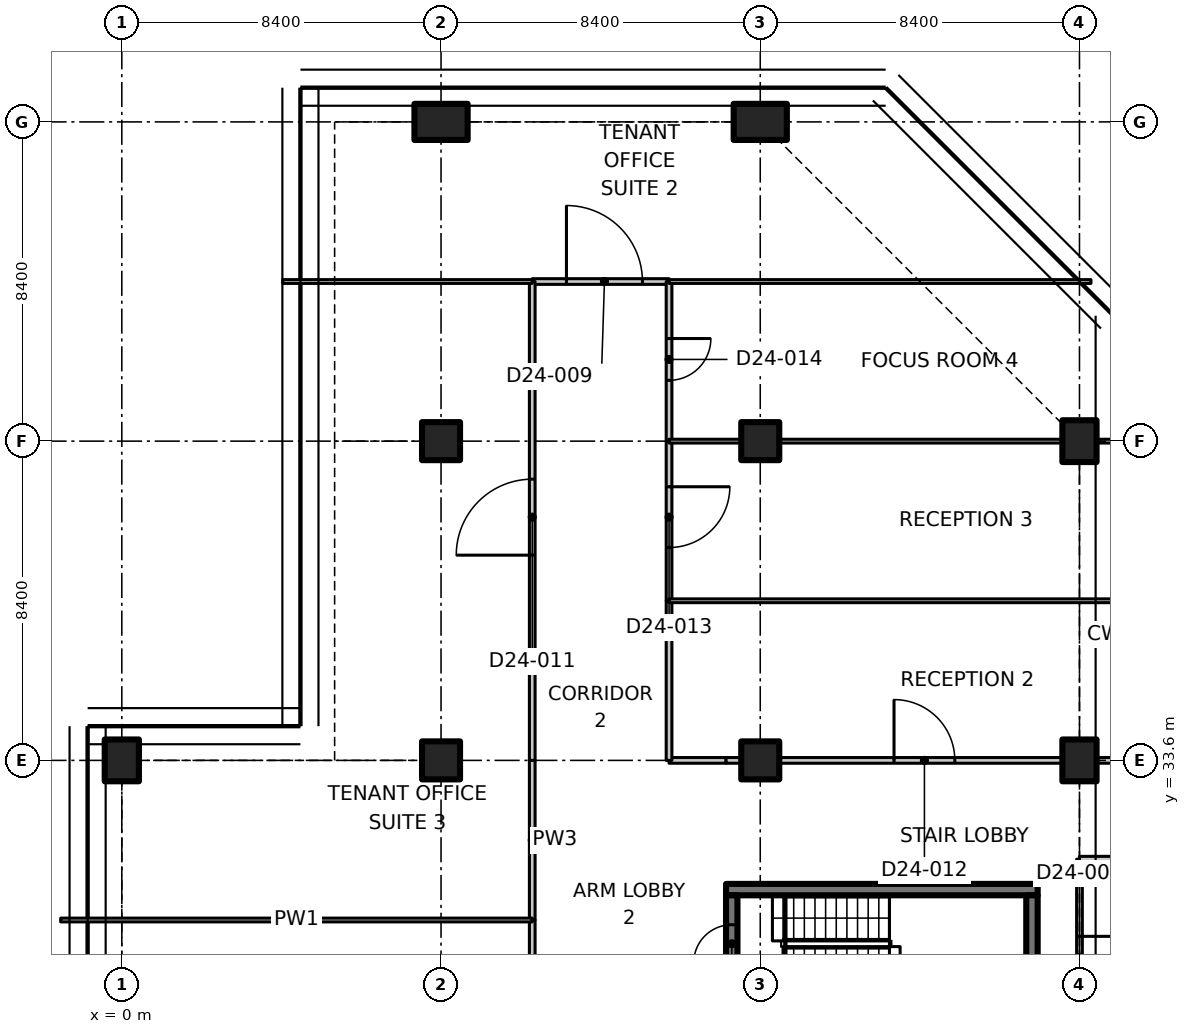
"""IFC4 building model, lengths in metres.
Left out: names, types, materials, properties, quantities, classifications, styles, units other than length and angle.
Written with IfcOpenShell. Run it as: python <this file> out.ifc"""

import sys

from ifc_helpers import new_model, si_unit, direction, frame, frame_2d, origin, origin_2d, place, context, subcontext, project, spatial, polyline, rectangle, outline, extrude, element, fill, save


model = new_model("IFC4")
c1 = context("Model", 3, precision=1e-05, world=origin(), true_north=direction((0.0, 1.0)))
c2 = subcontext(c1, "Body", "Model", "MODEL_VIEW")
j1 = project(units=[si_unit("LENGTHUNIT", "METRE"), si_unit("PLANEANGLEUNIT", "RADIAN")], contexts=[c1])
p1 = place(None, origin())
s1 = spatial("IfcSite", under=j1, at=p1, CompositionType="ELEMENT")
p2 = place(p1, origin())
s2 = spatial("IfcBuilding", under=s1, at=p2, CompositionType="ELEMENT")
p3 = place(p2, frame((0.0, 0.0, 199.2)))
s3 = spatial("IfcBuildingStorey", under=s2, at=p3, CompositionType="ELEMENT", Elevation=199.2)
p4 = place(p3, frame((0.0, 33.6, 0.0), z_axis=(0.0, 0.0, 1.0), x_axis=(1.0, 0.0, 0.0)))
e1 = element("IfcColumn", 1, at=p4, inside=s3, PredefinedType="COLUMN", context=c2, shape_type="SweptSolid", body=[
    extrude(rectangle(XDim=0.9, YDim=1.1, at=origin_2d()), origin(), (0.0, 0.0, 1.0), 3.35),
])
for number, where, z_axis, x_axis in (
    (2, (8.4, 33.6, 0.0), (0.0, 0.0, 1.0), (1.0, 0.0, 0.0)),
    (3, (8.4, 42.0, 0.0), (0.0, 0.0, 1.0), (1.0, 0.0, 0.0)),
):
    element("IfcColumn", number, at=place(p3, frame(where, z_axis=z_axis, x_axis=x_axis)), inside=s3, PredefinedType="COLUMN", context=c2, shape_type="SweptSolid", body=[
        extrude(rectangle(XDim=1.0, YDim=1.0, at=origin_2d()), origin(), (0.0, 0.0, 1.0), 3.35),
    ])
p5 = place(p3, frame((8.4, 50.4, 0.0), z_axis=(0.0, 0.0, 1.0), x_axis=(0.0, 1.0, 0.0)))
e4 = element("IfcColumn", 4, at=p5, inside=s3, PredefinedType="COLUMN", context=c2, shape_type="SweptSolid", body=[
    extrude(rectangle(XDim=0.95, YDim=1.4, at=origin_2d()), origin(), (0.0, 0.0, 1.0), 3.35),
])
for number, where, z_axis, x_axis in (
    (5, (16.8, 33.6, 0.0), (0.0, 0.0, 1.0), (1.0, 0.0, 0.0)),
    (6, (16.8, 42.0, 0.0), (0.0, 0.0, 1.0), (1.0, 0.0, 0.0)),
):
    element("IfcColumn", number, at=place(p3, frame(where, z_axis=z_axis, x_axis=x_axis)), inside=s3, PredefinedType="COLUMN", context=c2, shape_type="SweptSolid", body=[
        extrude(rectangle(XDim=1.0, YDim=1.0, at=origin_2d()), origin(), (0.0, 0.0, 1.0), 3.35),
    ])
p6 = place(p3, frame((16.8, 50.4, 0.0), z_axis=(0.0, 0.0, 1.0), x_axis=(0.0, 1.0, 0.0)))
e7 = element("IfcColumn", 7, at=p6, inside=s3, PredefinedType="COLUMN", context=c2, shape_type="SweptSolid", body=[
    extrude(rectangle(XDim=0.95, YDim=1.4, at=origin_2d()), origin(), (0.0, 0.0, 1.0), 3.35),
])
for number, where, z_axis, x_axis in (
    (8, (25.2, 33.6, 0.0), (0.0, 0.0, 1.0), (1.0, 0.0, 0.0)),
    (9, (25.2, 42.0, 0.0), (0.0, 0.0, 1.0), (1.0, 0.0, 0.0)),
):
    element("IfcColumn", number, at=place(p3, frame(where, z_axis=z_axis, x_axis=x_axis)), inside=s3, PredefinedType="COLUMN", context=c2, shape_type="SweptSolid", body=[
        extrude(rectangle(XDim=0.9, YDim=1.1, at=origin_2d()), origin(), (0.0, 0.0, 1.0), 3.35),
    ])
p7 = place(p3, frame((15.9, 30.2, 0.0), z_axis=(0.0, 0.0, 1.0), x_axis=(1.0, 0.0, 0.0)))
e10 = element("IfcWall", 10, at=p7, inside=s3, PredefinedType="SHEAR", context=c2, shape_type="SweptSolid", body=[
    extrude(rectangle(XDim=8.2, YDim=0.3, at=frame_2d((4.1, 0.0))), origin(), (0.0, 0.0, 1.0), 3.35),
])
p8 = place(p3, frame((16.05, 27.5, 0.0), z_axis=(0.0, 0.0, 1.0), x_axis=(0.0, 1.0, 0.0)))
e11 = element("IfcWall", 11, at=p8, inside=s3, PredefinedType="SHEAR", context=c2, shape_type="SweptSolid", body=[
    extrude(rectangle(XDim=2.55, YDim=0.3, at=frame_2d((1.275, 0.0))), origin(), (0.0, 0.0, 1.0), 3.35),
])
p9 = place(p8, frame((0.775, 0.0, 0.0)))
e12 = element("IfcOpeningElement", 12, at=p9, cuts=e11, PredefinedType="OPENING", context=c2, shape_type="SweptSolid", body=[
    extrude(rectangle(XDim=1.0, YDim=2.1, at=frame_2d((0.5, 1.05))), frame((0.0, 0.16, 0.0), z_axis=(0.0, -1.0, 0.0), x_axis=(1.0, 0.0, 0.0)), (0.0, 0.0, 1.0), 0.32),
])
p10 = place(p3, frame((23.95, 27.5, 0.0), z_axis=(0.0, 0.0, 1.0), x_axis=(0.0, 1.0, 0.0)))
e13 = element("IfcWall", 13, at=p10, inside=s3, PredefinedType="SHEAR", context=c2, shape_type="SweptSolid", body=[
    extrude(rectangle(XDim=2.55, YDim=0.3, at=frame_2d((1.275, 0.0))), origin(), (0.0, 0.0, 1.0), 3.35),
])
p11 = place(p3, frame((25.2, 31.0, 0.0), z_axis=(0.0, 0.0, 1.0), x_axis=(0.0, -1.0, 0.0)))
e14 = element("IfcWall", 14, at=p11, inside=s3, PredefinedType="PARTITIONING", context=c2, shape_type="SweptSolid", body=[
    extrude(outline(polyline([(0.0, 0.0), (5.23, 0.0), (5.23, 2.98), (0.0, 2.98), (0.0, 0.0)])), frame((0.0, 0.075, 0.0), z_axis=(0.0, -1.0, 0.0), x_axis=(1.0, 0.0, 0.0)), (0.0, 0.0, 1.0), 0.15),
])
p12 = place(p11, frame((2.03, 0.0, 0.0)))
e15 = element("IfcOpeningElement", 15, at=p12, cuts=e14, PredefinedType="OPENING", context=c2, shape_type="SweptSolid", body=[
    extrude(rectangle(XDim=1.1, YDim=2.1, at=frame_2d((0.55, 1.05))), frame((0.0, 0.085, 0.0), z_axis=(0.0, -1.0, 0.0), x_axis=(1.0, 0.0, 0.0)), (0.0, 0.0, 1.0), 0.17),
])
p13 = place(p3, frame((25.2, 31.0, 0.0), z_axis=(0.0, 0.0, 1.0), x_axis=(1.0, 0.0, 0.0)))
e16 = element("IfcWall", 16, at=p13, inside=s3, PredefinedType="PARTITIONING", context=c2, shape_type="SweptSolid", body=[
    extrude(rectangle(XDim=3.324, YDim=0.15, at=frame_2d((1.662, 0.0))), origin(), (0.0, 0.0, 1.0), 2.98),
])
p14 = place(p3, frame((10.8, 25.2, 0.0), z_axis=(0.0, 0.0, 1.0), x_axis=(0.0, 1.0, 0.0)))
e17 = element("IfcWall", 17, at=p14, inside=s3, PredefinedType="PARTITIONING", context=c2, shape_type="SweptSolid", body=[
    extrude(rectangle(XDim=4.2, YDim=0.15, at=frame_2d((2.1, 0.0))), origin(), (0.0, 0.0, 1.0), 3.33),
])
p15 = place(p14, frame((1.5, 0.0, 0.0)))
e18 = element("IfcOpeningElement", 18, at=p15, cuts=e17, PredefinedType="OPENING", context=c2, shape_type="SweptSolid", body=[
    extrude(rectangle(XDim=1.1, YDim=2.1, at=frame_2d((0.55, 1.05))), frame((0.0, 0.085, 0.0), z_axis=(0.0, -1.0, 0.0), x_axis=(1.0, 0.0, 0.0)), (0.0, 0.0, 1.0), 0.17),
])
p16 = place(p3, frame((10.8, 29.4, 0.0), z_axis=(0.0, 0.0, 1.0), x_axis=(0.0, 1.0, 0.0)))
e19 = element("IfcWall", 19, at=p16, inside=s3, PredefinedType="PARTITIONING", context=c2, shape_type="SweptSolid", body=[
    extrude(rectangle(XDim=4.2, YDim=0.15, at=frame_2d((2.1, 0.0))), origin(), (0.0, 0.0, 1.0), 3.33),
])
p17 = place(p3, frame((14.4, 33.6, 0.0), z_axis=(0.0, 0.0, 1.0), x_axis=(1.0, 0.0, 0.0)))
e20 = element("IfcWall", 20, at=p17, inside=s3, PredefinedType="PARTITIONING", context=c2, shape_type="SweptSolid", body=[
    extrude(rectangle(XDim=1.5, YDim=0.15, at=frame_2d((0.75, 0.0))), origin(), (0.0, 0.0, 1.0), 3.33),
])
p18 = place(p3, frame((15.9, 33.6, 0.0), z_axis=(0.0, 0.0, 1.0), x_axis=(1.0, 0.0, 0.0)))
e21 = element("IfcWall", 21, at=p18, inside=s3, PredefinedType="PARTITIONING", context=c2, shape_type="SweptSolid", body=[
    extrude(rectangle(XDim=0.38, YDim=0.15, at=frame_2d((0.19, 0.0))), origin(), (0.0, 0.0, 1.0), 3.33),
])
p19 = place(p3, frame((17.32, 33.6, 0.0), z_axis=(0.0, 0.0, 1.0), x_axis=(1.0, 0.0, 0.0)))
e22 = element("IfcWall", 22, at=p19, inside=s3, PredefinedType="PARTITIONING", context=c2, shape_type="SweptSolid", body=[
    extrude(rectangle(XDim=7.41, YDim=0.15, at=frame_2d((3.705, 0.0))), origin(), (0.0, 0.0, 1.0), 3.33),
])
p20 = place(p19, frame((3.0, 0.0, 0.0)))
e23 = element("IfcOpeningElement", 23, at=p20, cuts=e22, PredefinedType="OPENING", context=c2, shape_type="SweptSolid", body=[
    extrude(rectangle(XDim=1.6, YDim=2.1, at=frame_2d((0.8, 1.05))), frame((0.0, 0.085, 0.0), z_axis=(0.0, -1.0, 0.0), x_axis=(1.0, 0.0, 0.0)), (0.0, 0.0, 1.0), 0.17),
])
p21 = place(p3, frame((25.67, 33.6, 0.0), z_axis=(0.0, 0.0, 1.0), x_axis=(1.0, 0.0, 0.0)))
e24 = element("IfcWall", 24, at=p21, inside=s3, PredefinedType="PARTITIONING", context=c2, shape_type="SweptSolid", body=[
    extrude(rectangle(XDim=4.092, YDim=0.15, at=frame_2d((2.046, 0.0))), origin(), (0.0, 0.0, 1.0), 2.98),
])
p22 = place(p3, frame((10.8, 46.2, 0.0), z_axis=(0.0, 0.0, 1.0), x_axis=(1.0, 0.0, 0.0)))
e25 = element("IfcWall", 25, at=p22, inside=s3, PredefinedType="PARTITIONING", context=c2, shape_type="SweptSolid", body=[
    extrude(rectangle(XDim=3.6, YDim=0.15, at=frame_2d((1.8, 0.0))), origin(), (0.0, 0.0, 1.0), 3.33),
])
p23 = place(p22, frame((0.9, 0.0, 0.0)))
e26 = element("IfcOpeningElement", 26, at=p23, cuts=e25, PredefinedType="OPENING", context=c2, shape_type="SweptSolid", body=[
    extrude(rectangle(XDim=2.0, YDim=2.4, at=frame_2d((1.0, 1.2))), frame((0.0, 0.085, 0.0), z_axis=(0.0, -1.0, 0.0), x_axis=(1.0, 0.0, 0.0)), (0.0, 0.0, 1.0), 0.17),
])
p24 = place(p3, frame((10.8, 33.6, 0.0), z_axis=(0.0, 0.0, 1.0), x_axis=(0.0, 1.0, 0.0)))
e27 = element("IfcWall", 27, at=p24, inside=s3, PredefinedType="PARTITIONING", context=c2, shape_type="SweptSolid", body=[
    extrude(rectangle(XDim=12.6, YDim=0.15, at=frame_2d((6.3, 0.0))), origin(), (0.0, 0.0, 1.0), 3.33),
])
p25 = place(p24, frame((5.4, 0.0, 0.0)))
e28 = element("IfcOpeningElement", 28, at=p25, cuts=e27, PredefinedType="OPENING", context=c2, shape_type="SweptSolid", body=[
    extrude(rectangle(XDim=2.0, YDim=2.4, at=frame_2d((1.0, 1.2))), frame((0.0, 0.085, 0.0), z_axis=(0.0, -1.0, 0.0), x_axis=(1.0, 0.0, 0.0)), (0.0, 0.0, 1.0), 0.17),
])
p26 = place(p3, frame((14.4, 37.8, 0.0), z_axis=(0.0, 0.0, 1.0), x_axis=(0.0, -1.0, 0.0)))
e29 = element("IfcWall", 29, at=p26, inside=s3, PredefinedType="PARTITIONING", context=c2, shape_type="SweptSolid", body=[
    extrude(rectangle(XDim=4.2, YDim=0.15, at=frame_2d((2.1, 0.0))), origin(), (0.0, 0.0, 1.0), 3.33),
])
p27 = place(p3, frame((14.4, 42.0, 0.0), z_axis=(0.0, 0.0, 1.0), x_axis=(0.0, -1.0, 0.0)))
e30 = element("IfcWall", 30, at=p27, inside=s3, PredefinedType="PARTITIONING", context=c2, shape_type="SweptSolid", body=[
    extrude(rectangle(XDim=4.2, YDim=0.15, at=frame_2d((2.1, 0.0))), origin(), (0.0, 0.0, 1.0), 3.33),
])
p28 = place(p27, frame((1.2, 0.0, 0.0)))
e31 = element("IfcOpeningElement", 31, at=p28, cuts=e30, PredefinedType="OPENING", context=c2, shape_type="SweptSolid", body=[
    extrude(rectangle(XDim=1.6, YDim=2.1, at=frame_2d((0.8, 1.05))), frame((0.0, 0.085, 0.0), z_axis=(0.0, -1.0, 0.0), x_axis=(1.0, 0.0, 0.0)), (0.0, 0.0, 1.0), 0.17),
])
p29 = place(p3, frame((14.4, 46.2, 0.0), z_axis=(0.0, 0.0, 1.0), x_axis=(0.0, -1.0, 0.0)))
e32 = element("IfcWall", 32, at=p29, inside=s3, PredefinedType="PARTITIONING", context=c2, shape_type="SweptSolid", body=[
    extrude(rectangle(XDim=4.2, YDim=0.15, at=frame_2d((2.1, 0.0))), origin(), (0.0, 0.0, 1.0), 3.33),
])
p30 = place(p29, frame((1.5, 0.0, 0.0)))
e33 = element("IfcOpeningElement", 33, at=p30, cuts=e32, PredefinedType="OPENING", context=c2, shape_type="SweptSolid", body=[
    extrude(rectangle(XDim=1.1, YDim=2.1, at=frame_2d((0.55, 1.05))), frame((0.0, 0.085, 0.0), z_axis=(0.0, -1.0, 0.0), x_axis=(1.0, 0.0, 0.0)), (0.0, 0.0, 1.0), 0.17),
])
p31 = place(p3, frame((10.8, 46.2, 0.0), z_axis=(0.0, 0.0, 1.0), x_axis=(-1.0, 0.0, 0.0)))
e34 = element("IfcWall", 34, at=p31, inside=s3, PredefinedType="PARTITIONING", context=c2, shape_type="SweptSolid", body=[
    extrude(outline(polyline([(0.0, 0.0), (6.565, 0.0), (6.565, 3.33), (6.3, 3.33), (5.65, 3.33), (5.648, 2.98), (4.752, 2.98), (4.75, 3.33), (0.0, 3.33), (0.0, 0.0)])), frame((0.0, 0.05, 0.0), z_axis=(0.0, -1.0, 0.0), x_axis=(1.0, 0.0, 0.0)), (0.0, 0.0, 1.0), 0.1),
])
p32 = place(p3, frame((25.502, 46.2, 0.0), z_axis=(0.0, 0.0, 1.0), x_axis=(-1.0, 0.0, 0.0)))
e35 = element("IfcWall", 35, at=p32, inside=s3, PredefinedType="PARTITIONING", context=c2, shape_type="SweptSolid", body=[
    extrude(outline(polyline([(0.0, 0.0), (11.103, 0.0), (11.103, 3.33), (5.168, 3.33), (5.166, 2.98), (3.839, 2.98), (3.837, 3.33), (0.103, 3.33), (0.0, 3.33), (0.0, 0.0)])), frame((0.0, 0.05, 0.0), z_axis=(0.0, -1.0, 0.0), x_axis=(1.0, 0.0, 0.0)), (0.0, 0.0, 1.0), 0.1),
])
p33 = place(p3, frame((-1.609, 29.4, 0.0), z_axis=(0.0, 0.0, 1.0), x_axis=(1.0, 0.0, 0.0)))
e36 = element("IfcWall", 36, at=p33, inside=s3, PredefinedType="PARTITIONING", context=c2, shape_type="SweptSolid", body=[
    extrude(outline(polyline([(0.0, 0.0), (12.409, 0.0), (12.409, 3.33), (2.059, 3.33), (2.057, 2.98), (1.161, 2.98), (1.159, 3.33), (0.509, 3.33), (0.0, 3.33), (0.0, 0.0)])), frame((0.0, 0.05, 0.0), z_axis=(0.0, -1.0, 0.0), x_axis=(1.0, 0.0, 0.0)), (0.0, 0.0, 1.0), 0.1),
])
p34 = place(p3, frame((14.4, 37.8, 0.0), z_axis=(0.0, 0.0, 1.0), x_axis=(1.0, 0.0, 0.0)))
e37 = element("IfcWall", 37, at=p34, inside=s3, PredefinedType="PARTITIONING", context=c2, shape_type="SweptSolid", body=[
    extrude(outline(polyline([(0.0, 0.0), (15.843, 0.0), (15.843, 3.33), (11.25, 3.33), (11.248, 2.98), (10.352, 2.98), (10.35, 3.33), (0.0, 3.33), (0.0, 0.0)])), frame((0.0, 0.05, 0.0), z_axis=(0.0, -1.0, 0.0), x_axis=(1.0, 0.0, 0.0)), (0.0, 0.0, 1.0), 0.1),
])
p35 = place(p3, frame((14.4, 42.0, 0.0), z_axis=(0.0, 0.0, 1.0), x_axis=(1.0, 0.0, 0.0)))
e38 = element("IfcWall", 38, at=p35, inside=s3, PredefinedType="PARTITIONING", context=c2, shape_type="SweptSolid", body=[
    extrude(rectangle(XDim=1.88, YDim=0.1, at=frame_2d((0.94, 0.0))), origin(), (0.0, 0.0, 1.0), 3.33),
])
p36 = place(p3, frame((17.32, 42.0, 0.0), z_axis=(0.0, 0.0, 1.0), x_axis=(1.0, 0.0, 0.0)))
e39 = element("IfcWall", 39, at=p36, inside=s3, PredefinedType="PARTITIONING", context=c2, shape_type="SweptSolid", body=[
    extrude(outline(polyline([(0.0, 0.0), (7.41, 0.0), (7.41, 2.98), (7.216, 2.98), (7.214, 3.33), (0.0, 3.33), (0.0, 0.0)])), frame((0.0, 0.05, 0.0), z_axis=(0.0, -1.0, 0.0), x_axis=(1.0, 0.0, 0.0)), (0.0, 0.0, 1.0), 0.1),
])
p37 = place(p3, frame((25.67, 42.0, 0.0), z_axis=(0.0, 0.0, 1.0), x_axis=(1.0, 0.0, 0.0)))
e40 = element("IfcWall", 40, at=p37, inside=s3, PredefinedType="PARTITIONING", context=c2, shape_type="SweptSolid", body=[
    extrude(rectangle(XDim=3.342, YDim=0.1, at=frame_2d((1.671, 0.0))), origin(), (0.0, 0.0, 1.0), 2.98),
])
p38 = place(p9, origin())
e41 = element("IfcDoor", 41, at=p38, inside=s3, OperationType="SINGLE_SWING_LEFT", PredefinedType="DOOR", context=c2, shape_type="SweptSolid", body=[
    extrude(rectangle(XDim=1.0, YDim=2.1, at=frame_2d((0.5, 1.05))), frame((0.0, 0.025, 0.0), z_axis=(0.0, -1.0, 0.0), x_axis=(1.0, 0.0, 0.0)), (0.0, 0.0, 1.0), 0.05),
])
fill(e12, e41)
p39 = place(p12, origin())
e42 = element("IfcDoor", 42, at=p39, inside=s3, OperationType="SINGLE_SWING_RIGHT", PredefinedType="DOOR", context=c2, shape_type="SweptSolid", body=[
    extrude(rectangle(XDim=1.1, YDim=2.1, at=frame_2d((0.55, 1.05))), frame((0.0, 0.025, 0.0), z_axis=(0.0, -1.0, 0.0), x_axis=(1.0, 0.0, 0.0)), (0.0, 0.0, 1.0), 0.05),
])
fill(e15, e42)
p40 = place(p23, origin())
e43 = element("IfcDoor", 43, at=p40, inside=s3, OperationType="DOUBLE_DOOR_SINGLE_SWING", PredefinedType="DOOR", context=c2, shape_type="SweptSolid", body=[
    extrude(rectangle(XDim=2.0, YDim=2.4, at=frame_2d((1.0, 1.2))), frame((0.0, 0.025, 0.0), z_axis=(0.0, -1.0, 0.0), x_axis=(1.0, 0.0, 0.0)), (0.0, 0.0, 1.0), 0.05),
])
fill(e26, e43)
p41 = place(p25, origin())
e44 = element("IfcDoor", 44, at=p41, inside=s3, OperationType="DOUBLE_DOOR_SINGLE_SWING", PredefinedType="DOOR", context=c2, shape_type="SweptSolid", body=[
    extrude(rectangle(XDim=2.0, YDim=2.4, at=frame_2d((1.0, 1.2))), frame((0.0, 0.025, 0.0), z_axis=(0.0, -1.0, 0.0), x_axis=(1.0, 0.0, 0.0)), (0.0, 0.0, 1.0), 0.05),
])
fill(e28, e44)
p42 = place(p20, origin())
e45 = element("IfcDoor", 45, at=p42, inside=s3, OperationType="DOUBLE_DOOR_SINGLE_SWING", PredefinedType="DOOR", context=c2, shape_type="SweptSolid", body=[
    extrude(rectangle(XDim=1.6, YDim=2.1, at=frame_2d((0.8, 1.05))), frame((0.0, 0.025, 0.0), z_axis=(0.0, -1.0, 0.0), x_axis=(1.0, 0.0, 0.0)), (0.0, 0.0, 1.0), 0.05),
])
fill(e23, e45)
p43 = place(p28, origin())
e46 = element("IfcDoor", 46, at=p43, inside=s3, OperationType="DOUBLE_DOOR_SINGLE_SWING", PredefinedType="DOOR", context=c2, shape_type="SweptSolid", body=[
    extrude(rectangle(XDim=1.6, YDim=2.1, at=frame_2d((0.8, 1.05))), frame((0.0, 0.025, 0.0), z_axis=(0.0, -1.0, 0.0), x_axis=(1.0, 0.0, 0.0)), (0.0, 0.0, 1.0), 0.05),
])
fill(e31, e46)
p44 = place(p30, origin())
e47 = element("IfcDoor", 47, at=p44, inside=s3, OperationType="SINGLE_SWING_LEFT", PredefinedType="DOOR", context=c2, shape_type="SweptSolid", body=[
    extrude(rectangle(XDim=1.1, YDim=2.1, at=frame_2d((0.55, 1.05))), frame((0.0, 0.025, 0.0), z_axis=(0.0, -1.0, 0.0), x_axis=(1.0, 0.0, 0.0)), (0.0, 0.0, 1.0), 0.05),
])
fill(e33, e47)
save(model, sys.argv[1])
